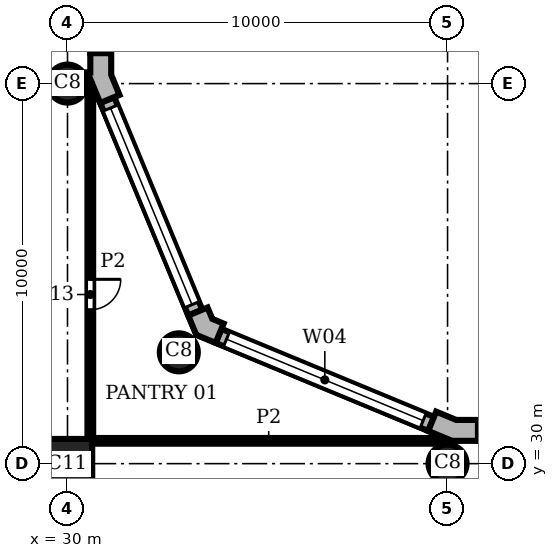
"""IFC4 building model, lengths in metres.
Left out: names, types, materials, properties, quantities, classifications, styles, units other than length and angle.
Written with IfcOpenShell. Run it as: python <this file> out.ifc"""

import sys

from ifc_helpers import new_model, si_unit, direction, frame, frame_2d, origin, origin_2d, place, context, subcontext, project, spatial, polyline, rectangle, circle, outline, extrude, element, fill, save


model = new_model("IFC4")
c1 = context("Model", 3, precision=1e-05, world=origin(), true_north=direction((0.0, 1.0)))
c2 = subcontext(c1, "Body", "Model", "MODEL_VIEW")
j1 = project(units=[si_unit("LENGTHUNIT", "METRE"), si_unit("PLANEANGLEUNIT", "RADIAN")], contexts=[c1])
p1 = place(None, origin())
s1 = spatial("IfcSite", under=j1, at=p1, CompositionType="ELEMENT")
p2 = place(p1, origin())
s2 = spatial("IfcBuilding", under=s1, at=p2, CompositionType="ELEMENT")
p3 = place(p2, frame((0.0, 0.0, 170.7)))
s3 = spatial("IfcBuildingStorey", under=s2, at=p3, CompositionType="ELEMENT", Elevation=170.7)
for number, where, z_axis, x_axis in (
    (1, (40.0, 30.0, 0.0), (0.0, 0.0, 1.0), (1.0, 0.0, 0.0)),
    (2, (32.929, 32.929, 0.0), (0.0, 0.0, 1.0), (1.0, 0.0, 0.0)),
    (3, (30.0, 40.0, 0.0), (0.0, 0.0, 1.0), (1.0, 0.0, 0.0)),
):
    element("IfcColumn", number, at=place(p3, frame(where, z_axis=z_axis, x_axis=x_axis)), inside=s3, PredefinedType="COLUMN", context=c2, shape_type="SweptSolid", body=[
        extrude(circle(Radius=0.5, at=origin_2d()), origin(), (0.0, 0.0, 1.0), 3.9),
    ])
p4 = place(p3, frame((30.0, 30.0, 0.0), z_axis=(0.0, 0.0, 1.0), x_axis=(1.0, 0.0, 0.0)))
e4 = element("IfcColumn", 4, at=p4, inside=s3, PredefinedType="COLUMN", context=c2, shape_type="SweptSolid", body=[
    extrude(rectangle(XDim=1.3, YDim=1.3, at=origin_2d()), origin(), (0.0, 0.0, 1.0), 3.9),
])
p5 = place(p3, origin())
e5 = element("IfcWall", 5, at=p5, inside=s3, PredefinedType="SOLIDWALL", context=c2, shape_type="SweptSolid", body=[
    extrude(outline(polyline([(40.8, 31.0), (40.8, 31.15), (40.229, 31.15), (39.701, 31.369), (39.644, 31.23), (39.49, 30.861), (40.119, 30.6), (40.8, 30.6), (40.8, 31.0)])), origin(), (0.0, 0.0, 1.0), 3.9),
])
e6 = element("IfcWall", 6, at=p5, inside=s3, PredefinedType="SOLIDWALL", context=c2, shape_type="SweptSolid", body=[
    extrude(outline(polyline([(34.051, 33.547), (34.108, 33.685), (33.809, 33.809), (33.685, 34.108), (33.547, 34.051), (33.177, 33.898), (33.388, 33.388), (33.898, 33.177), (34.051, 33.547)])), origin(), (0.0, 0.0, 1.0), 3.9),
])
e7 = element("IfcWall", 7, at=p5, inside=s3, PredefinedType="SOLIDWALL", context=c2, shape_type="SweptSolid", body=[
    extrude(outline(polyline([(30.62, 39.995), (30.62, 40.071), (30.861, 39.49), (31.23, 39.644), (31.369, 39.701), (31.15, 40.229), (31.15, 40.8), (31.0, 40.8), (30.6, 40.8), (30.6, 40.295), (30.5, 40.295), (30.5, 39.995), (30.62, 39.995)])), origin(), (0.0, 0.0, 1.0), 3.9),
])
p6 = place(p3, frame((59.2, 30.8, 0.0), z_axis=(0.0, 0.0, 1.0), x_axis=(-1.0, 0.0, 0.0)))
e8 = element("IfcWall", 8, at=p6, inside=s3, PredefinedType="SOLIDWALL", context=c2, shape_type="SweptSolid", body=[
    extrude(rectangle(XDim=18.4, YDim=0.4, at=frame_2d((9.2, 0.0))), origin(), (0.0, 0.0, 1.0), 3.9),
])
p7 = place(p6, frame((0.2, 0.0, 0.9)))
e9 = element("IfcOpeningElement", 9, at=p7, cuts=e8, PredefinedType="OPENING", context=c2, shape_type="SweptSolid", body=[
    extrude(rectangle(XDim=8.0, YDim=2.35, at=frame_2d((4.0, 1.175))), frame((0.0, 0.21, 0.0), z_axis=(0.0, -1.0, 0.0), x_axis=(1.0, 0.0, 0.0)), (0.0, 0.0, 1.0), 0.42),
])
p8 = place(p6, frame((10.2, 0.0, 0.9)))
e10 = element("IfcOpeningElement", 10, at=p8, cuts=e8, PredefinedType="OPENING", context=c2, shape_type="SweptSolid", body=[
    extrude(rectangle(XDim=8.0, YDim=2.35, at=frame_2d((4.0, 1.175))), frame((0.0, 0.21, 0.0), z_axis=(0.0, -1.0, 0.0), x_axis=(1.0, 0.0, 0.0)), (0.0, 0.0, 1.0), 0.42),
])
p9 = place(p3, frame((39.567, 31.045, 0.0), z_axis=(0.0, 0.0, 1.0), x_axis=(-0.923891000409, 0.382655745237, 0.0)))
e11 = element("IfcWall", 11, at=p9, inside=s3, PredefinedType="SOLIDWALL", context=c2, shape_type="SweptSolid", body=[
    extrude(rectangle(XDim=6.053, YDim=0.4, at=frame_2d((3.027, 0.0))), origin(), (0.0, 0.0, 1.0), 3.9),
])
p10 = place(p9, frame((0.227, 0.0, 0.9)))
e12 = element("IfcOpeningElement", 12, at=p10, cuts=e11, PredefinedType="OPENING", context=c2, shape_type="SweptSolid", body=[
    extrude(rectangle(XDim=5.6, YDim=2.35, at=frame_2d((2.8, 1.175))), frame((0.0, 0.21, 0.0), z_axis=(0.0, -1.0, 0.0), x_axis=(1.0, 0.0, 0.0)), (0.0, 0.0, 1.0), 0.42),
])
p11 = place(p3, frame((33.362, 33.974, 0.0), z_axis=(0.0, 0.0, 1.0), x_axis=(-0.382655745237, 0.923891000409, 0.0)))
e13 = element("IfcWall", 13, at=p11, inside=s3, PredefinedType="SOLIDWALL", context=c2, shape_type="SweptSolid", body=[
    extrude(rectangle(XDim=6.053, YDim=0.4, at=frame_2d((3.027, 0.0))), origin(), (0.0, 0.0, 1.0), 3.9),
])
p12 = place(p11, frame((0.227, 0.0, 0.9)))
e14 = element("IfcOpeningElement", 14, at=p12, cuts=e13, PredefinedType="OPENING", context=c2, shape_type="SweptSolid", body=[
    extrude(rectangle(XDim=5.6, YDim=2.35, at=frame_2d((2.8, 1.175))), frame((0.0, 0.21, 0.0), z_axis=(0.0, -1.0, 0.0), x_axis=(1.0, 0.0, 0.0)), (0.0, 0.0, 1.0), 0.42),
])
p13 = place(p3, frame((30.8, 40.8, 0.0), z_axis=(0.0, 0.0, 1.0), x_axis=(0.0, 1.0, 0.0)))
e15 = element("IfcWall", 15, at=p13, inside=s3, PredefinedType="SOLIDWALL", context=c2, shape_type="SweptSolid", body=[
    extrude(rectangle(XDim=18.4, YDim=0.4, at=frame_2d((9.2, 0.0))), origin(), (0.0, 0.0, 1.0), 3.9),
])
p14 = place(p13, frame((0.2, 0.0, 0.9)))
e16 = element("IfcOpeningElement", 16, at=p14, cuts=e15, PredefinedType="OPENING", context=c2, shape_type="SweptSolid", body=[
    extrude(rectangle(XDim=8.0, YDim=2.35, at=frame_2d((4.0, 1.175))), frame((0.0, 0.21, 0.0), z_axis=(0.0, -1.0, 0.0), x_axis=(1.0, 0.0, 0.0)), (0.0, 0.0, 1.0), 0.42),
])
p15 = place(p13, frame((10.2, 0.0, 0.9)))
e17 = element("IfcOpeningElement", 17, at=p15, cuts=e15, PredefinedType="OPENING", context=c2, shape_type="SweptSolid", body=[
    extrude(rectangle(XDim=8.0, YDim=2.35, at=frame_2d((4.0, 1.175))), frame((0.0, 0.21, 0.0), z_axis=(0.0, -1.0, 0.0), x_axis=(1.0, 0.0, 0.0)), (0.0, 0.0, 1.0), 0.42),
])
p16 = place(p3, frame((30.6, 30.65, 0.0), z_axis=(0.0, 0.0, 1.0), x_axis=(0.0, 1.0, 0.0)))
e18 = element("IfcWall", 18, at=p16, inside=s3, PredefinedType="PARTITIONING", context=c2, shape_type="SweptSolid", body=[
    extrude(rectangle(XDim=9.288, YDim=0.15, at=frame_2d((4.644, 0.0))), origin(), (0.0, 0.0, 1.0), 3.58),
])
p17 = place(p16, frame((3.4, 0.0, 0.0)))
e19 = element("IfcOpeningElement", 19, at=p17, cuts=e18, PredefinedType="OPENING", context=c2, shape_type="SweptSolid", body=[
    extrude(rectangle(XDim=0.8, YDim=2.1, at=frame_2d((0.4, 1.05))), frame((0.0, 0.085, 0.0), z_axis=(0.0, -1.0, 0.0), x_axis=(1.0, 0.0, 0.0)), (0.0, 0.0, 1.0), 0.17),
])
p18 = place(p3, frame((30.65, 30.6, 0.0), z_axis=(0.0, 0.0, 1.0), x_axis=(1.0, 0.0, 0.0)))
e20 = element("IfcWall", 20, at=p18, inside=s3, PredefinedType="PARTITIONING", context=c2, shape_type="SweptSolid", body=[
    extrude(rectangle(XDim=9.288, YDim=0.15, at=frame_2d((4.644, 0.0))), origin(), (0.0, 0.0, 1.0), 3.58),
])
p19 = place(p10, origin())
e21 = element("IfcWindow", 21, at=p19, inside=s3, PartitioningType="SINGLE_PANEL", PredefinedType="WINDOW", context=c2, shape_type="SweptSolid", body=[
    extrude(rectangle(XDim=5.6, YDim=2.35, at=frame_2d((2.8, 1.175))), frame((0.0, 0.16, 0.0), z_axis=(0.0, -1.0, 0.0), x_axis=(1.0, 0.0, 0.0)), (0.0, 0.0, 1.0), 0.06),
])
fill(e12, e21)
p20 = place(p12, origin())
e22 = element("IfcWindow", 22, at=p20, inside=s3, PartitioningType="SINGLE_PANEL", PredefinedType="WINDOW", context=c2, shape_type="SweptSolid", body=[
    extrude(rectangle(XDim=5.6, YDim=2.35, at=frame_2d((2.8, 1.175))), frame((0.0, 0.16, 0.0), z_axis=(0.0, -1.0, 0.0), x_axis=(1.0, 0.0, 0.0)), (0.0, 0.0, 1.0), 0.06),
])
fill(e14, e22)
p21 = place(p17, frame((0.8, 0.0, 0.0), z_axis=(0.0, 0.0, 1.0), x_axis=(-1.0, 0.0, 0.0)))
e23 = element("IfcDoor", 23, at=p21, inside=s3, OperationType="SINGLE_SWING_LEFT", PredefinedType="DOOR", context=c2, shape_type="SweptSolid", body=[
    extrude(rectangle(XDim=0.8, YDim=2.1, at=frame_2d((0.4, 1.05))), frame((0.0, 0.025, 0.0), z_axis=(0.0, -1.0, 0.0), x_axis=(1.0, 0.0, 0.0)), (0.0, 0.0, 1.0), 0.05),
])
fill(e19, e23)
save(model, sys.argv[1])
